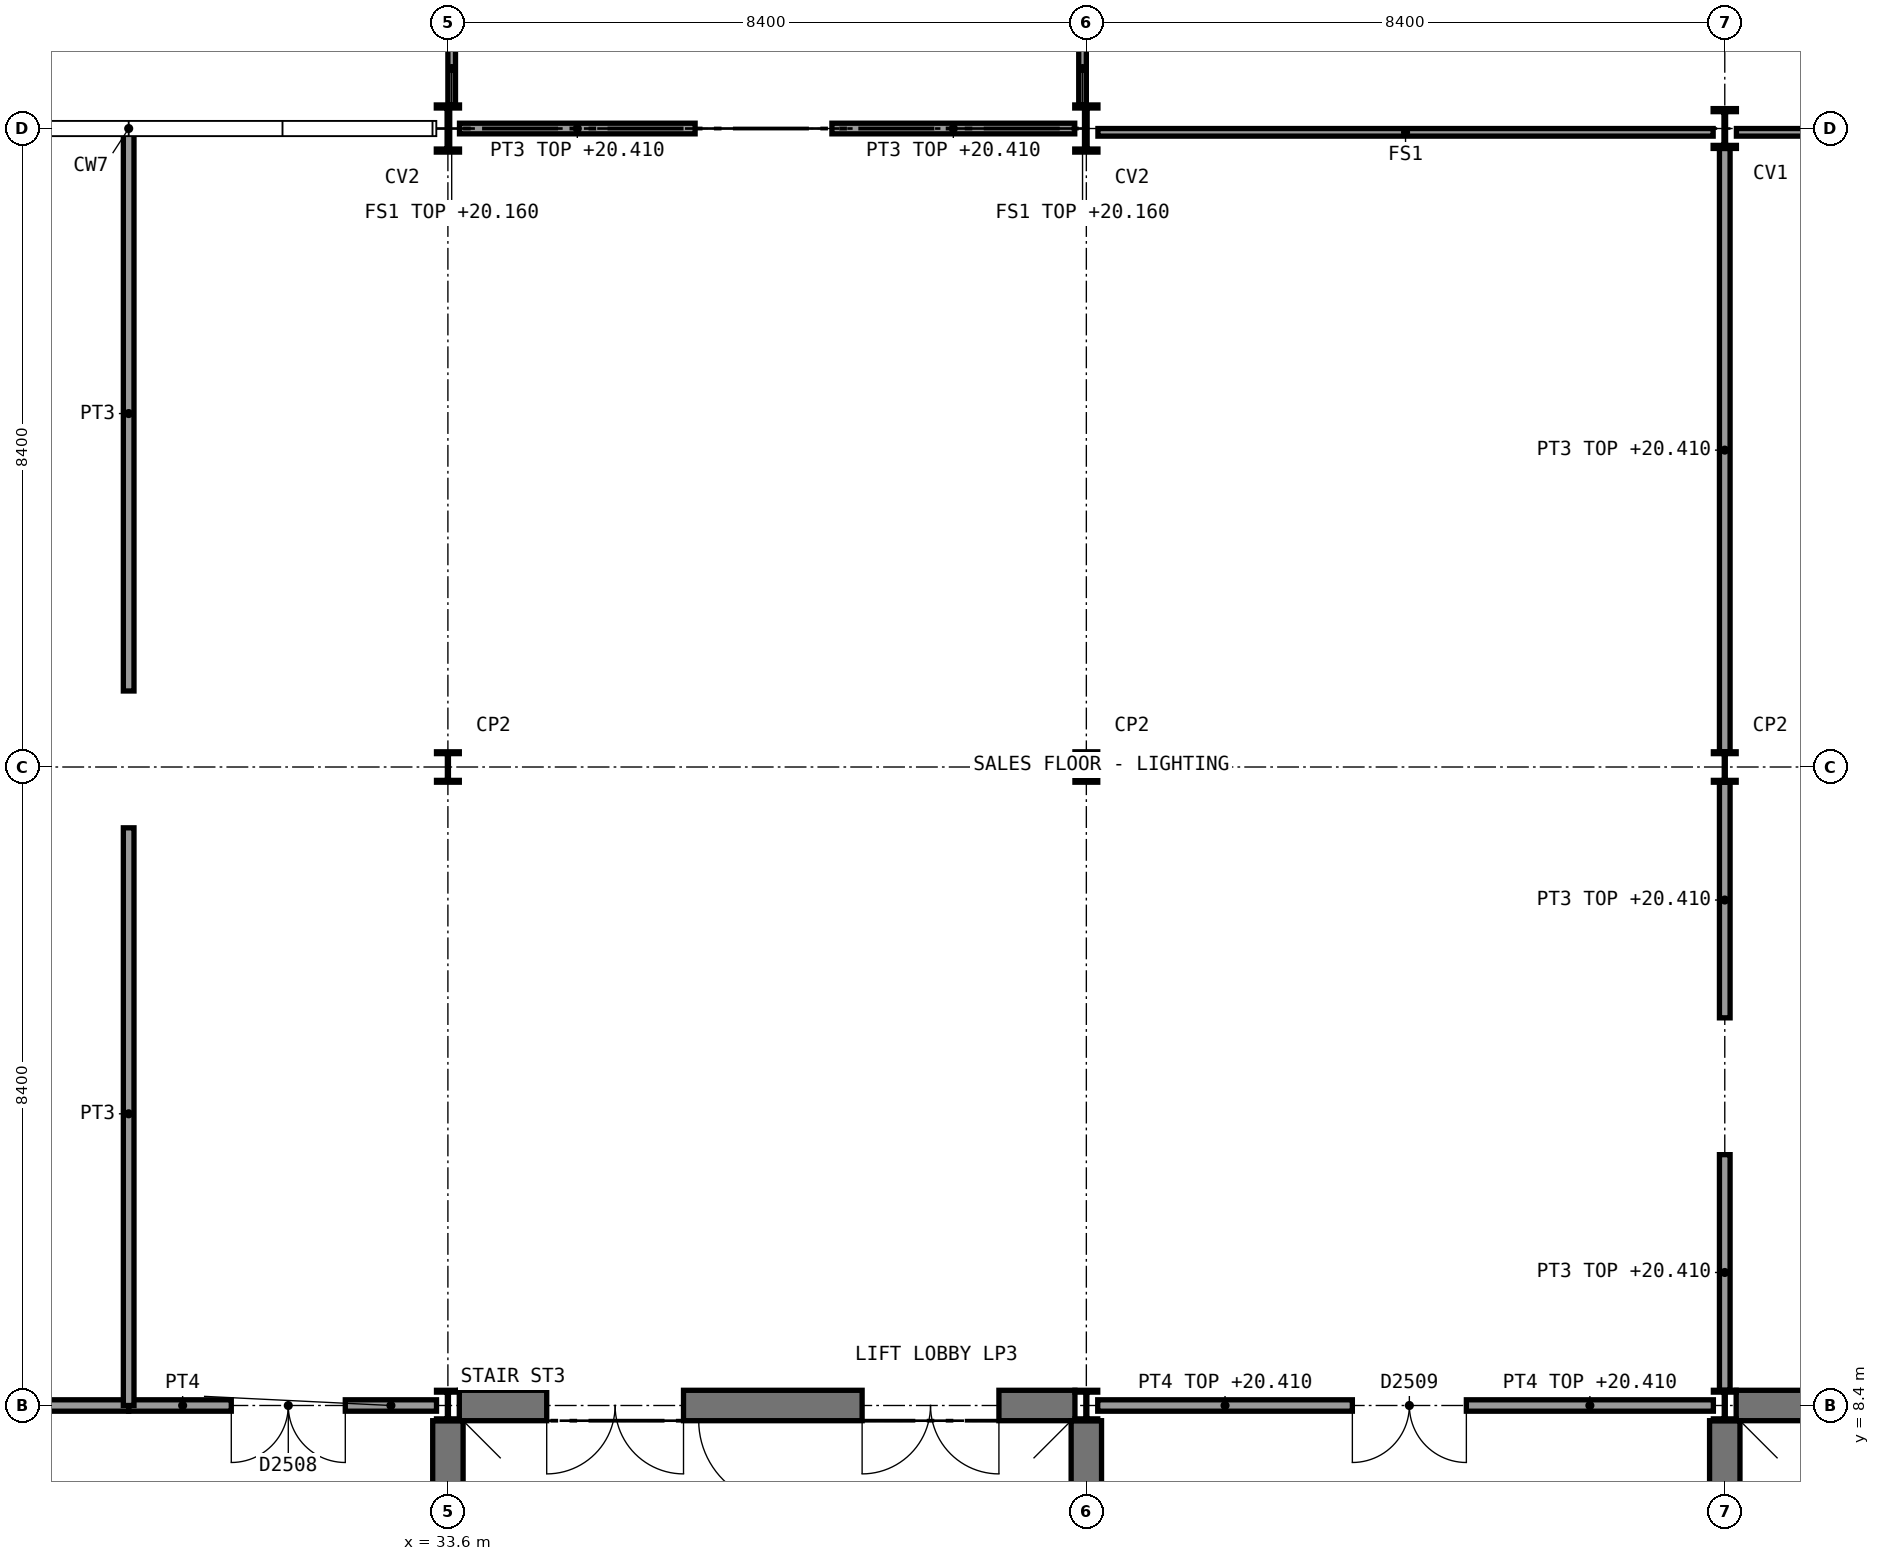
"""IFC4 building model, lengths in metres.
Left out: names, types, materials, properties, quantities, classifications, styles, units other than length and angle.
Written with IfcOpenShell. Run it as: python <this file> out.ifc"""

import sys

from ifc_helpers import new_model, si_unit, direction, frame, frame_2d, origin, origin_2d, place, context, subcontext, project, spatial, rectangle, i_section, extrude, element, fill, save


model = new_model("IFC4")
c1 = context("Model", 3, precision=1e-05, world=origin(), true_north=direction((0.0, 1.0)))
c2 = subcontext(c1, "Body", "Model", "MODEL_VIEW")
j1 = project(units=[si_unit("LENGTHUNIT", "METRE"), si_unit("PLANEANGLEUNIT", "RADIAN")], contexts=[c1])
p1 = place(None, origin())
s1 = spatial("IfcSite", under=j1, at=p1, CompositionType="ELEMENT")
p2 = place(p1, origin())
s2 = spatial("IfcBuilding", under=s1, at=p2, CompositionType="ELEMENT")
p3 = place(p2, frame((0.0, 0.0, 16.2)))
s3 = spatial("IfcBuildingStorey", under=s2, at=p3, CompositionType="ELEMENT", Elevation=16.2)
p4 = place(p3, frame((33.75, 8.4, 0.0), z_axis=(0.0, 0.0, 1.0), x_axis=(1.0, 0.0, 0.0)))
e1 = element("IfcWall", 1, at=p4, inside=s3, PredefinedType="SHEAR", context=c2, shape_type="SweptSolid", body=[
    extrude(rectangle(XDim=8.1, YDim=0.4, at=frame_2d((4.05, 0.0))), origin(), (0.0, 0.0, 1.0), 4.65),
])
p5 = place(p4, frame((1.15, 0.0, 0.0)))
e2 = element("IfcOpeningElement", 2, at=p5, cuts=e1, PredefinedType="OPENING", context=c2, shape_type="SweptSolid", body=[
    extrude(rectangle(XDim=1.8, YDim=2.1, at=frame_2d((0.9, 1.05))), frame((0.0, 0.21, 0.0), z_axis=(0.0, -1.0, 0.0), x_axis=(1.0, 0.0, 0.0)), (0.0, 0.0, 1.0), 0.42),
])
p6 = place(p4, frame((5.3, 0.0, 0.0)))
e3 = element("IfcOpeningElement", 3, at=p6, cuts=e1, PredefinedType="OPENING", context=c2, shape_type="SweptSolid", body=[
    extrude(rectangle(XDim=1.8, YDim=2.1, at=frame_2d((0.9, 1.05))), frame((0.0, 0.21, 0.0), z_axis=(0.0, -1.0, 0.0), x_axis=(1.0, 0.0, 0.0)), (0.0, 0.0, 1.0), 0.42),
])
for number, where, z_axis, x_axis in (
    (4, (33.6, 0.2, 0.0), (0.0, 0.0, 1.0), (0.0, 1.0, 0.0)),
    (5, (42.0, 0.2, 0.0), (0.0, 0.0, 1.0), (0.0, 1.0, 0.0)),
):
    element("IfcWall", number, at=place(p3, frame(where, z_axis=z_axis, x_axis=x_axis)), inside=s3, PredefinedType="SHEAR", context=c2, shape_type="SweptSolid", body=[
        extrude(rectangle(XDim=8.0, YDim=0.4, at=frame_2d((4.0, 0.0))), origin(), (0.0, 0.0, 1.0), 4.65),
    ])
p7 = place(p3, frame((50.55, 8.4, 0.0), z_axis=(0.0, 0.0, 1.0), x_axis=(1.0, 0.0, 0.0)))
e6 = element("IfcWall", 6, at=p7, inside=s3, PredefinedType="SHEAR", context=c2, shape_type="SweptSolid", body=[
    extrude(rectangle(XDim=8.1, YDim=0.4, at=frame_2d((4.05, 0.0))), origin(), (0.0, 0.0, 1.0), 4.65),
])
p8 = place(p7, frame((1.15, 0.0, 0.0)))
e7 = element("IfcOpeningElement", 7, at=p8, cuts=e6, PredefinedType="OPENING", context=c2, shape_type="SweptSolid", body=[
    extrude(rectangle(XDim=1.8, YDim=2.1, at=frame_2d((0.9, 1.05))), frame((0.0, 0.21, 0.0), z_axis=(0.0, -1.0, 0.0), x_axis=(1.0, 0.0, 0.0)), (0.0, 0.0, 1.0), 0.42),
])
p9 = place(p7, frame((5.6, 0.0, 0.0)))
e8 = element("IfcOpeningElement", 8, at=p9, cuts=e6, PredefinedType="OPENING", context=c2, shape_type="SweptSolid", body=[
    extrude(rectangle(XDim=1.2, YDim=2.1, at=frame_2d((0.6, 1.05))), frame((0.0, 0.21, 0.0), z_axis=(0.0, -1.0, 0.0), x_axis=(1.0, 0.0, 0.0)), (0.0, 0.0, 1.0), 0.42),
])
p10 = place(p3, frame((50.4, 0.2, 0.0), z_axis=(0.0, 0.0, 1.0), x_axis=(0.0, 1.0, 0.0)))
e9 = element("IfcWall", 9, at=p10, inside=s3, PredefinedType="SHEAR", context=c2, shape_type="SweptSolid", body=[
    extrude(rectangle(XDim=8.0, YDim=0.4, at=frame_2d((4.0, 0.0))), origin(), (0.0, 0.0, 1.0), 4.65),
])
for number, where, z_axis, x_axis in (
    (10, (33.6, 8.4, 0.0), (0.0, 0.0, 1.0), (1.0, 0.0, 0.0)),
    (11, (33.6, 16.8, 0.0), (0.0, 0.0, 1.0), (1.0, 0.0, 0.0)),
):
    element("IfcColumn", number, at=place(p3, frame(where, z_axis=z_axis, x_axis=x_axis)), inside=s3, PredefinedType="COLUMN", context=c2, shape_type="SweptSolid", body=[
        extrude(i_section(OverallWidth=0.3, OverallDepth=0.4, WebThickness=0.013, FlangeThickness=0.024, FilletRadius=0.027, at=origin_2d()), origin(), (0.0, 0.0, 1.0), 4.8),
    ])
p11 = place(p3, frame((33.6, 25.2, 0.0), z_axis=(0.0, 0.0, 1.0), x_axis=(1.0, 0.0, 0.0)))
e12 = element("IfcColumn", 12, at=p11, inside=s3, PredefinedType="COLUMN", context=c2, shape_type="SweptSolid", body=[
    extrude(i_section(OverallWidth=0.305, OverallDepth=0.62, WebThickness=0.021, FlangeThickness=0.04, FilletRadius=0.027, at=origin_2d()), origin(), (0.0, 0.0, 1.0), 4.8),
])
for number, where, z_axis, x_axis in (
    (13, (42.0, 8.4, 0.0), (0.0, 0.0, 1.0), (1.0, 0.0, 0.0)),
    (14, (42.0, 16.8, 0.0), (0.0, 0.0, 1.0), (1.0, 0.0, 0.0)),
):
    element("IfcColumn", number, at=place(p3, frame(where, z_axis=z_axis, x_axis=x_axis)), inside=s3, PredefinedType="COLUMN", context=c2, shape_type="SweptSolid", body=[
        extrude(i_section(OverallWidth=0.3, OverallDepth=0.4, WebThickness=0.013, FlangeThickness=0.024, FilletRadius=0.027, at=origin_2d()), origin(), (0.0, 0.0, 1.0), 4.8),
    ])
p12 = place(p3, frame((42.0, 25.2, 0.0), z_axis=(0.0, 0.0, 1.0), x_axis=(1.0, 0.0, 0.0)))
e15 = element("IfcColumn", 15, at=p12, inside=s3, PredefinedType="COLUMN", context=c2, shape_type="SweptSolid", body=[
    extrude(i_section(OverallWidth=0.305, OverallDepth=0.62, WebThickness=0.021, FlangeThickness=0.04, FilletRadius=0.027, at=origin_2d()), origin(), (0.0, 0.0, 1.0), 4.8),
])
for number, where, z_axis, x_axis in (
    (16, (50.4, 8.4, 0.0), (0.0, 0.0, 1.0), (1.0, 0.0, 0.0)),
    (17, (50.4, 16.8, 0.0), (0.0, 0.0, 1.0), (1.0, 0.0, 0.0)),
):
    element("IfcColumn", number, at=place(p3, frame(where, z_axis=z_axis, x_axis=x_axis)), inside=s3, PredefinedType="COLUMN", context=c2, shape_type="SweptSolid", body=[
        extrude(i_section(OverallWidth=0.3, OverallDepth=0.4, WebThickness=0.013, FlangeThickness=0.024, FilletRadius=0.027, at=origin_2d()), origin(), (0.0, 0.0, 1.0), 4.8),
    ])
p13 = place(p3, frame((50.4, 25.2, 0.0), z_axis=(0.0, 0.0, 1.0), x_axis=(1.0, 0.0, 0.0)))
e18 = element("IfcColumn", 18, at=p13, inside=s3, PredefinedType="COLUMN", context=c2, shape_type="SweptSolid", body=[
    extrude(i_section(OverallWidth=0.306, OverallDepth=0.524, WebThickness=0.021, FlangeThickness=0.04, FilletRadius=0.027, at=origin_2d()), origin(), (0.0, 0.0, 1.0), 4.8),
])
p14 = place(p3, frame((25.35, 8.4, 0.0), z_axis=(0.0, 0.0, 1.0), x_axis=(1.0, 0.0, 0.0)))
e19 = element("IfcWall", 19, at=p14, inside=s3, PredefinedType="SOLIDWALL", context=c2, shape_type="SweptSolid", body=[
    extrude(rectangle(XDim=4.05, YDim=0.15, at=frame_2d((2.025, 0.0))), origin(), (0.0, 0.0, 1.0), 4.32),
])
p15 = place(p3, frame((29.4, 8.4, 0.0), z_axis=(0.0, 0.0, 1.0), x_axis=(1.0, 0.0, 0.0)))
e20 = element("IfcWall", 20, at=p15, inside=s3, PredefinedType="SOLIDWALL", context=c2, shape_type="SweptSolid", body=[
    extrude(rectangle(XDim=4.05, YDim=0.15, at=frame_2d((2.025, 0.0))), origin(), (0.0, 0.0, 1.0), 4.32),
])
p16 = place(p15, frame((1.35, 0.0, 0.0)))
e21 = element("IfcOpeningElement", 21, at=p16, cuts=e20, PredefinedType="OPENING", context=c2, shape_type="SweptSolid", body=[
    extrude(rectangle(XDim=1.5, YDim=2.1, at=frame_2d((0.75, 1.05))), frame((0.0, 0.085, 0.0), z_axis=(0.0, -1.0, 0.0), x_axis=(1.0, 0.0, 0.0)), (0.0, 0.0, 1.0), 0.17),
])
p17 = place(p3, frame((42.15, 8.4, 0.0), z_axis=(0.0, 0.0, 1.0), x_axis=(1.0, 0.0, 0.0)))
e22 = element("IfcWall", 22, at=p17, inside=s3, PredefinedType="SOLIDWALL", context=c2, shape_type="SweptSolid", body=[
    extrude(rectangle(XDim=8.1, YDim=0.15, at=frame_2d((4.05, 0.0))), origin(), (0.0, 0.0, 1.0), 4.21),
])
p18 = place(p17, frame((3.35, 0.0, 0.0)))
e23 = element("IfcOpeningElement", 23, at=p18, cuts=e22, PredefinedType="OPENING", context=c2, shape_type="SweptSolid", body=[
    extrude(rectangle(XDim=1.5, YDim=2.1, at=frame_2d((0.75, 1.05))), frame((0.0, 0.085, 0.0), z_axis=(0.0, -1.0, 0.0), x_axis=(1.0, 0.0, 0.0)), (0.0, 0.0, 1.0), 0.17),
])
p19 = place(p3, frame((29.4, 8.4, 0.0), z_axis=(0.0, 0.0, 1.0), x_axis=(0.0, 1.0, 0.0)))
e24 = element("IfcWall", 24, at=p19, inside=s3, PredefinedType="PARTITIONING", context=c2, shape_type="SweptSolid", body=[
    extrude(rectangle(XDim=7.6, YDim=0.14, at=frame_2d((3.8, 0.0))), origin(), (0.0, 0.0, 1.0), 4.65),
])
p20 = place(p3, frame((29.4, 17.8, 0.0), z_axis=(0.0, 0.0, 1.0), x_axis=(0.0, 1.0, 0.0)))
e25 = element("IfcWall", 25, at=p20, inside=s3, PredefinedType="PARTITIONING", context=c2, shape_type="SweptSolid", body=[
    extrude(rectangle(XDim=7.4, YDim=0.14, at=frame_2d((3.7, 0.0))), origin(), (0.0, 0.0, 1.0), 4.65),
])
for number, where, z_axis, x_axis in (
    (26, (50.4, 8.6, 0.0), (0.0, 0.0, 1.0), (0.0, 1.0, 0.0)),
    (27, (50.4, 13.5, 0.0), (0.0, 0.0, 1.0), (0.0, 1.0, 0.0)),
):
    element("IfcWall", number, at=place(p3, frame(where, z_axis=z_axis, x_axis=x_axis)), inside=s3, PredefinedType="PARTITIONING", context=c2, shape_type="SweptSolid", body=[
        extrude(rectangle(XDim=3.1, YDim=0.14, at=frame_2d((1.55, 0.0))), origin(), (0.0, 0.0, 1.0), 4.21),
    ])
p21 = place(p3, frame((50.4, 17.0, 0.0), z_axis=(0.0, 0.0, 1.0), x_axis=(0.0, 1.0, 0.0)))
e28 = element("IfcWall", 28, at=p21, inside=s3, PredefinedType="PARTITIONING", context=c2, shape_type="SweptSolid", body=[
    extrude(rectangle(XDim=7.938, YDim=0.14, at=frame_2d((3.969, 0.0))), origin(), (0.0, 0.0, 1.0), 4.21),
])
p22 = place(p3, frame((33.753, 25.2, 0.0), z_axis=(0.0, 0.0, 1.0), x_axis=(1.0, 0.0, 0.0)))
e29 = element("IfcWall", 29, at=p22, inside=s3, PredefinedType="PARTITIONING", context=c2, shape_type="SweptSolid", body=[
    extrude(rectangle(XDim=3.1, YDim=0.14, at=frame_2d((1.55, 0.0))), origin(), (0.0, 0.0, 1.0), 4.21),
])
p23 = place(p3, frame((38.653, 25.2, 0.0), z_axis=(0.0, 0.0, 1.0), x_axis=(1.0, 0.0, 0.0)))
e30 = element("IfcWall", 30, at=p23, inside=s3, PredefinedType="PARTITIONING", context=c2, shape_type="SweptSolid", body=[
    extrude(rectangle(XDim=3.195, YDim=0.14, at=frame_2d((1.597, 0.0))), origin(), (0.0, 0.0, 1.0), 4.21),
])
p24 = place(p3, frame((38.0, 0.2, 0.0), z_axis=(0.0, 0.0, 1.0), x_axis=(0.0, 1.0, 0.0)))
e31 = element("IfcWall", 31, at=p24, inside=s3, PredefinedType="SHEAR", context=c2, shape_type="SweptSolid", body=[
    extrude(rectangle(XDim=8.0, YDim=0.2, at=frame_2d((4.0, 0.0))), origin(), (0.0, 0.0, 1.0), 4.65),
])
p25 = place(p24, frame((6.9, 0.0, 0.0)))
e32 = element("IfcOpeningElement", 32, at=p25, cuts=e31, PredefinedType="OPENING", context=c2, shape_type="SweptSolid", body=[
    extrude(rectangle(XDim=1.11, YDim=2.1, at=frame_2d((0.555, 1.05))), frame((0.0, 0.11, 0.0), z_axis=(0.0, -1.0, 0.0), x_axis=(1.0, 0.0, 0.0)), (0.0, 0.0, 1.0), 0.22),
])
p26 = place(p3, frame((42.153, 25.15, 0.0), z_axis=(0.0, 0.0, 1.0), x_axis=(1.0, 0.0, 0.0)))
e33 = element("IfcWall", 33, at=p26, inside=s3, PredefinedType="PARTITIONING", context=c2, shape_type="SweptSolid", body=[
    extrude(rectangle(XDim=8.094, YDim=0.1, at=frame_2d((4.047, 0.0))), origin(), (0.0, 0.0, 1.0), 4.11),
])
p27 = place(p3, frame((50.553, 25.15, 0.0), z_axis=(0.0, 0.0, 1.0), x_axis=(1.0, 0.0, 0.0)))
e34 = element("IfcWall", 34, at=p27, inside=s3, PredefinedType="PARTITIONING", context=c2, shape_type="SweptSolid", body=[
    extrude(rectangle(XDim=8.094, YDim=0.1, at=frame_2d((4.047, 0.0))), origin(), (0.0, 0.0, 1.0), 4.11),
])
for number, where, z_axis, x_axis in (
    (35, (33.65, 25.51, 0.0), (0.0, 0.0, 1.0), (0.0, 1.0, 0.0)),
    (36, (41.95, 25.51, 0.0), (0.0, 0.0, 1.0), (0.0, 1.0, 0.0)),
):
    element("IfcWall", number, at=place(p3, frame(where, z_axis=z_axis, x_axis=x_axis)), inside=s3, PredefinedType="PARTITIONING", context=c2, shape_type="SweptSolid", body=[
        extrude(rectangle(XDim=11.98, YDim=0.1, at=frame_2d((5.99, 0.0))), origin(), (0.0, 0.0, 1.0), 3.96),
    ])
p28 = place(p16, frame((1.5, 0.0, 0.0), z_axis=(0.0, 0.0, 1.0), x_axis=(-1.0, 0.0, 0.0)))
e37 = element("IfcDoor", 37, at=p28, inside=s3, OperationType="DOUBLE_DOOR_SINGLE_SWING", PredefinedType="DOOR", context=c2, shape_type="SweptSolid", body=[
    extrude(rectangle(XDim=1.5, YDim=2.1, at=frame_2d((0.75, 1.05))), frame((0.0, 0.025, 0.0), z_axis=(0.0, -1.0, 0.0), x_axis=(1.0, 0.0, 0.0)), (0.0, 0.0, 1.0), 0.05),
])
fill(e21, e37)
p29 = place(p18, frame((1.5, 0.0, 0.0), z_axis=(0.0, 0.0, 1.0), x_axis=(-1.0, 0.0, 0.0)))
e38 = element("IfcDoor", 38, at=p29, inside=s3, OperationType="DOUBLE_DOOR_SINGLE_SWING", PredefinedType="DOOR", context=c2, shape_type="SweptSolid", body=[
    extrude(rectangle(XDim=1.5, YDim=2.1, at=frame_2d((0.75, 1.05))), frame((0.0, 0.025, 0.0), z_axis=(0.0, -1.0, 0.0), x_axis=(1.0, 0.0, 0.0)), (0.0, 0.0, 1.0), 0.05),
])
fill(e23, e38)
p30 = place(p25, origin())
e39 = element("IfcDoor", 39, at=p30, inside=s3, OperationType="SINGLE_SWING_RIGHT", PredefinedType="DOOR", context=c2, shape_type="SweptSolid", body=[
    extrude(rectangle(XDim=1.1, YDim=2.1, at=frame_2d((0.55, 1.05))), frame((0.0, 0.025, 0.0), z_axis=(0.0, -1.0, 0.0), x_axis=(1.0, 0.0, 0.0)), (0.0, 0.0, 1.0), 0.05),
])
fill(e32, e39)
p31 = place(p5, frame((1.8, 0.0, 0.0), z_axis=(0.0, 0.0, 1.0), x_axis=(-1.0, 0.0, 0.0)))
e40 = element("IfcDoor", 40, at=p31, inside=s3, OperationType="DOUBLE_DOOR_SINGLE_SWING", PredefinedType="DOOR", context=c2, shape_type="SweptSolid", body=[
    extrude(rectangle(XDim=1.8, YDim=2.1, at=frame_2d((0.9, 1.05))), frame((0.0, 0.025, 0.0), z_axis=(0.0, -1.0, 0.0), x_axis=(1.0, 0.0, 0.0)), (0.0, 0.0, 1.0), 0.05),
])
fill(e2, e40)
p32 = place(p6, frame((1.8, 0.0, 0.0), z_axis=(0.0, 0.0, 1.0), x_axis=(-1.0, 0.0, 0.0)))
e41 = element("IfcDoor", 41, at=p32, inside=s3, OperationType="DOUBLE_DOOR_SINGLE_SWING", PredefinedType="DOOR", context=c2, shape_type="SweptSolid", body=[
    extrude(rectangle(XDim=1.8, YDim=2.1, at=frame_2d((0.9, 1.05))), frame((0.0, 0.025, 0.0), z_axis=(0.0, -1.0, 0.0), x_axis=(1.0, 0.0, 0.0)), (0.0, 0.0, 1.0), 0.05),
])
fill(e3, e41)
save(model, sys.argv[1])
